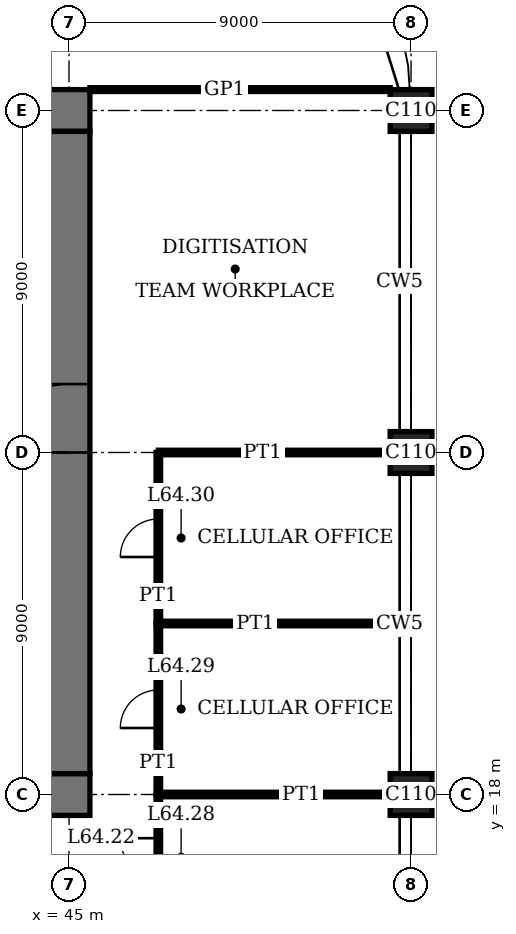
"""IFC4 building model, lengths in metres.
Left out: names, types, materials, properties, quantities, classifications, styles, units other than length and angle.
Written with IfcOpenShell. Run it as: python <this file> out.ifc"""

import sys

from ifc_helpers import new_model, si_unit, direction, frame, frame_2d, origin, origin_2d, place, context, subcontext, project, spatial, rectangle, extrude, element, fill, save


model = new_model("IFC4")
c1 = context("Model", 3, precision=1e-05, world=origin(), true_north=direction((0.0, 1.0)))
c2 = subcontext(c1, "Body", "Model", "MODEL_VIEW")
j1 = project(units=[si_unit("LENGTHUNIT", "METRE"), si_unit("PLANEANGLEUNIT", "RADIAN")], contexts=[c1])
p1 = place(None, origin())
s1 = spatial("IfcSite", under=j1, at=p1, CompositionType="ELEMENT")
p2 = place(p1, origin())
s2 = spatial("IfcBuilding", under=s1, at=p2, CompositionType="ELEMENT")
p3 = place(p2, frame((0.0, 0.0, 263.4)))
s3 = spatial("IfcBuildingStorey", under=s2, at=p3, CompositionType="ELEMENT", Elevation=263.4)
for number, where, z_axis, x_axis in (
    (1, (54.0, 18.0, 0.0), (0.0, 0.0, 1.0), (1.0, 0.0, 0.0)),
    (2, (54.0, 27.0, 0.0), (0.0, 0.0, 1.0), (1.0, 0.0, 0.0)),
    (3, (54.0, 36.0, 0.0), (0.0, 0.0, 1.0), (1.0, 0.0, 0.0)),
):
    element("IfcColumn", number, at=place(p3, frame(where, z_axis=z_axis, x_axis=x_axis)), inside=s3, PredefinedType="COLUMN", context=c2, shape_type="SweptSolid", body=[
        extrude(rectangle(XDim=1.1, YDim=1.1, at=origin_2d()), origin(), (0.0, 0.0, 1.0), 4.0),
    ])
p4 = place(p3, frame((17.45, 18.0, 0.0), z_axis=(0.0, 0.0, 1.0), x_axis=(1.0, 0.0, 0.0)))
e4 = element("IfcWall", 4, at=p4, inside=s3, PredefinedType="SHEAR", context=c2, shape_type="SweptSolid", body=[
    extrude(rectangle(XDim=28.1, YDim=1.1, at=frame_2d((14.05, 0.0))), origin(), (0.0, 0.0, 1.0), 4.0),
])
p5 = place(p4, frame((11.55, 0.0, 0.0)))
e5 = element("IfcOpeningElement", 5, at=p5, cuts=e4, PredefinedType="OPENING", context=c2, shape_type="SweptSolid", body=[
    extrude(rectangle(XDim=1.0, YDim=2.4, at=frame_2d((0.5, 1.2))), frame((0.0, 0.56, 0.0), z_axis=(0.0, -1.0, 0.0), x_axis=(1.0, 0.0, 0.0)), (0.0, 0.0, 1.0), 1.12),
])
p6 = place(p4, frame((16.55, 0.0, 0.0)))
e6 = element("IfcOpeningElement", 6, at=p6, cuts=e4, PredefinedType="OPENING", context=c2, shape_type="SweptSolid", body=[
    extrude(rectangle(XDim=1.0, YDim=2.4, at=frame_2d((0.5, 1.2))), frame((0.0, 0.56, 0.0), z_axis=(0.0, -1.0, 0.0), x_axis=(1.0, 0.0, 0.0)), (0.0, 0.0, 1.0), 1.12),
])
p7 = place(p4, frame((20.0, 0.0, 0.0)))
e7 = element("IfcOpeningElement", 7, at=p7, cuts=e4, PredefinedType="OPENING", context=c2, shape_type="SweptSolid", body=[
    extrude(rectangle(XDim=1.1, YDim=2.4, at=frame_2d((0.55, 1.2))), frame((0.0, 0.56, 0.0), z_axis=(0.0, -1.0, 0.0), x_axis=(1.0, 0.0, 0.0)), (0.0, 0.0, 1.0), 1.12),
])
p8 = place(p4, frame((24.05, 0.0, 0.0)))
e8 = element("IfcOpeningElement", 8, at=p8, cuts=e4, PredefinedType="OPENING", context=c2, shape_type="SweptSolid", body=[
    extrude(rectangle(XDim=1.0, YDim=2.4, at=frame_2d((0.5, 1.2))), frame((0.0, 0.56, 0.0), z_axis=(0.0, -1.0, 0.0), x_axis=(1.0, 0.0, 0.0)), (0.0, 0.0, 1.0), 1.12),
])
p9 = place(p3, frame((45.55, 36.0, 0.0), z_axis=(0.0, 0.0, 1.0), x_axis=(-1.0, 0.0, 0.0)))
e9 = element("IfcWall", 9, at=p9, inside=s3, PredefinedType="SHEAR", context=c2, shape_type="SweptSolid", body=[
    extrude(rectangle(XDim=28.1, YDim=1.1, at=frame_2d((14.05, 0.0))), origin(), (0.0, 0.0, 1.0), 4.0),
])
p10 = place(p9, frame((11.55, 0.0, 0.0)))
e10 = element("IfcOpeningElement", 10, at=p10, cuts=e9, PredefinedType="OPENING", context=c2, shape_type="SweptSolid", body=[
    extrude(rectangle(XDim=1.0, YDim=2.4, at=frame_2d((0.5, 1.2))), frame((0.0, 0.56, 0.0), z_axis=(0.0, -1.0, 0.0), x_axis=(1.0, 0.0, 0.0)), (0.0, 0.0, 1.0), 1.12),
])
p11 = place(p9, frame((16.55, 0.0, 0.0)))
e11 = element("IfcOpeningElement", 11, at=p11, cuts=e9, PredefinedType="OPENING", context=c2, shape_type="SweptSolid", body=[
    extrude(rectangle(XDim=1.0, YDim=2.4, at=frame_2d((0.5, 1.2))), frame((0.0, 0.56, 0.0), z_axis=(0.0, -1.0, 0.0), x_axis=(1.0, 0.0, 0.0)), (0.0, 0.0, 1.0), 1.12),
])
p12 = place(p9, frame((20.0, 0.0, 0.0)))
e12 = element("IfcOpeningElement", 12, at=p12, cuts=e9, PredefinedType="OPENING", context=c2, shape_type="SweptSolid", body=[
    extrude(rectangle(XDim=1.1, YDim=2.4, at=frame_2d((0.55, 1.2))), frame((0.0, 0.56, 0.0), z_axis=(0.0, -1.0, 0.0), x_axis=(1.0, 0.0, 0.0)), (0.0, 0.0, 1.0), 1.12),
])
p13 = place(p9, frame((24.05, 0.0, 0.0)))
e13 = element("IfcOpeningElement", 13, at=p13, cuts=e9, PredefinedType="OPENING", context=c2, shape_type="SweptSolid", body=[
    extrude(rectangle(XDim=1.0, YDim=2.4, at=frame_2d((0.5, 1.2))), frame((0.0, 0.56, 0.0), z_axis=(0.0, -1.0, 0.0), x_axis=(1.0, 0.0, 0.0)), (0.0, 0.0, 1.0), 1.12),
])
p14 = place(p3, frame((45.0, 18.55, 0.0), z_axis=(0.0, 0.0, 1.0), x_axis=(0.0, 1.0, 0.0)))
e14 = element("IfcWall", 14, at=p14, inside=s3, PredefinedType="SHEAR", context=c2, shape_type="SweptSolid", body=[
    extrude(rectangle(XDim=16.9, YDim=1.1, at=frame_2d((8.45, 0.0))), origin(), (0.0, 0.0, 1.0), 4.0),
])
p15 = place(p14, frame((8.45, 0.0, 0.0)))
e15 = element("IfcOpeningElement", 15, at=p15, cuts=e14, PredefinedType="OPENING", context=c2, shape_type="SweptSolid", body=[
    extrude(rectangle(XDim=1.8, YDim=2.4, at=frame_2d((0.9, 1.2))), frame((0.0, 0.56, 0.0), z_axis=(0.0, -1.0, 0.0), x_axis=(1.0, 0.0, 0.0)), (0.0, 0.0, 1.0), 1.12),
])
p16 = place(p3, frame((47.35, 18.0, 0.0), z_axis=(0.0, 0.0, 1.0), x_axis=(1.0, 0.0, 0.0)))
e16 = element("IfcWall", 16, at=p16, inside=s3, PredefinedType="PARTITIONING", context=c2, shape_type="SweptSolid", body=[
    extrude(rectangle(XDim=6.1, YDim=0.12, at=frame_2d((3.05, 0.0))), origin(), (0.0, 0.0, 1.0), 3.05),
])
p17 = place(p3, frame((47.35, 22.5, 0.0), z_axis=(0.0, 0.0, 1.0), x_axis=(1.0, 0.0, 0.0)))
e17 = element("IfcWall", 17, at=p17, inside=s3, PredefinedType="PARTITIONING", context=c2, shape_type="SweptSolid", body=[
    extrude(rectangle(XDim=6.34, YDim=0.12, at=frame_2d((3.17, 0.0))), origin(), (0.0, 0.0, 1.0), 3.1),
])
p18 = place(p3, frame((47.35, 27.0, 0.0), z_axis=(0.0, 0.0, 1.0), x_axis=(1.0, 0.0, 0.0)))
e18 = element("IfcWall", 18, at=p18, inside=s3, PredefinedType="PARTITIONING", context=c2, shape_type="SweptSolid", body=[
    extrude(rectangle(XDim=6.1, YDim=0.12, at=frame_2d((3.05, 0.0))), origin(), (0.0, 0.0, 1.0), 3.05),
])
p19 = place(p3, frame((45.55, 36.55, 0.0), z_axis=(0.0, 0.0, 1.0), x_axis=(1.0, 0.0, 0.0)))
e19 = element("IfcWall", 19, at=p19, inside=s3, PredefinedType="PARTITIONING", context=c2, shape_type="SweptSolid", body=[
    extrude(rectangle(XDim=7.9, YDim=0.1, at=frame_2d((3.95, 0.0))), origin(), (0.0, 0.0, 1.0), 3.75),
])
p20 = place(p3, frame((47.35, 13.5, 0.0), z_axis=(0.0, 0.0, 1.0), x_axis=(0.0, 1.0, 0.0)))
e20 = element("IfcWall", 20, at=p20, inside=s3, PredefinedType="PARTITIONING", context=c2, shape_type="SweptSolid", body=[
    extrude(rectangle(XDim=4.5, YDim=0.12, at=frame_2d((2.25, 0.0))), origin(), (0.0, 0.0, 1.0), 3.75),
])
p21 = place(p20, frame((2.35, 0.0, 0.0)))
e21 = element("IfcOpeningElement", 21, at=p21, cuts=e20, PredefinedType="OPENING", context=c2, shape_type="SweptSolid", body=[
    extrude(rectangle(XDim=1.0, YDim=2.4, at=frame_2d((0.5, 1.2))), frame((0.0, 0.07, 0.0), z_axis=(0.0, -1.0, 0.0), x_axis=(1.0, 0.0, 0.0)), (0.0, 0.0, 1.0), 0.14),
])
p22 = place(p3, frame((47.35, 18.0, 0.0), z_axis=(0.0, 0.0, 1.0), x_axis=(0.0, 1.0, 0.0)))
e22 = element("IfcWall", 22, at=p22, inside=s3, PredefinedType="PARTITIONING", context=c2, shape_type="SweptSolid", body=[
    extrude(rectangle(XDim=4.5, YDim=0.12, at=frame_2d((2.25, 0.0))), origin(), (0.0, 0.0, 1.0), 3.75),
])
p23 = place(p22, frame((1.75, 0.0, 0.0)))
e23 = element("IfcOpeningElement", 23, at=p23, cuts=e22, PredefinedType="OPENING", context=c2, shape_type="SweptSolid", body=[
    extrude(rectangle(XDim=1.0, YDim=2.4, at=frame_2d((0.5, 1.2))), frame((0.0, 0.07, 0.0), z_axis=(0.0, -1.0, 0.0), x_axis=(1.0, 0.0, 0.0)), (0.0, 0.0, 1.0), 0.14),
])
p24 = place(p3, frame((47.35, 22.5, 0.0), z_axis=(0.0, 0.0, 1.0), x_axis=(0.0, 1.0, 0.0)))
e24 = element("IfcWall", 24, at=p24, inside=s3, PredefinedType="PARTITIONING", context=c2, shape_type="SweptSolid", body=[
    extrude(rectangle(XDim=4.5, YDim=0.12, at=frame_2d((2.25, 0.0))), origin(), (0.0, 0.0, 1.0), 3.75),
])
p25 = place(p24, frame((1.75, 0.0, 0.0)))
e25 = element("IfcOpeningElement", 25, at=p25, cuts=e24, PredefinedType="OPENING", context=c2, shape_type="SweptSolid", body=[
    extrude(rectangle(XDim=1.0, YDim=2.4, at=frame_2d((0.5, 1.2))), frame((0.0, 0.07, 0.0), z_axis=(0.0, -1.0, 0.0), x_axis=(1.0, 0.0, 0.0)), (0.0, 0.0, 1.0), 0.14),
])
p26 = place(p15, origin())
e26 = element("IfcDoor", 26, at=p26, inside=s3, OperationType="DOUBLE_DOOR_DOUBLE_SWING", PredefinedType="DOOR", context=c2, shape_type="SweptSolid", body=[
    extrude(rectangle(XDim=1.8, YDim=2.4, at=frame_2d((0.9, 1.2))), frame((0.0, 0.03, 0.0), z_axis=(0.0, -1.0, 0.0), x_axis=(1.0, 0.0, 0.0)), (0.0, 0.0, 1.0), 0.06),
    extrude(rectangle(XDim=0.04, YDim=2.4, at=frame_2d((0.02, 1.2))), frame((0.0, 0.55, 0.0), z_axis=(0.0, -1.0, 0.0), x_axis=(1.0, 0.0, 0.0)), (0.0, 0.0, 1.0), 1.1),
    extrude(rectangle(XDim=0.04, YDim=2.4, at=frame_2d((1.78, 1.2))), frame((0.0, 0.55, 0.0), z_axis=(0.0, -1.0, 0.0), x_axis=(1.0, 0.0, 0.0)), (0.0, 0.0, 1.0), 1.1),
    extrude(rectangle(XDim=1.8, YDim=0.04, at=frame_2d((0.9, 2.38))), frame((0.0, 0.55, 0.0), z_axis=(0.0, -1.0, 0.0), x_axis=(1.0, 0.0, 0.0)), (0.0, 0.0, 1.0), 1.1),
])
fill(e15, e26)
p27 = place(p21, origin())
e27 = element("IfcDoor", 27, at=p27, inside=s3, OperationType="SINGLE_SWING_LEFT", PredefinedType="DOOR", context=c2, shape_type="SweptSolid", body=[
    extrude(rectangle(XDim=1.0, YDim=2.4, at=frame_2d((0.5, 1.2))), frame((0.0, 0.025, 0.0), z_axis=(0.0, -1.0, 0.0), x_axis=(1.0, 0.0, 0.0)), (0.0, 0.0, 1.0), 0.05),
])
fill(e21, e27)
p28 = place(p23, origin())
e28 = element("IfcDoor", 28, at=p28, inside=s3, OperationType="SINGLE_SWING_RIGHT", PredefinedType="DOOR", context=c2, shape_type="SweptSolid", body=[
    extrude(rectangle(XDim=1.0, YDim=2.4, at=frame_2d((0.5, 1.2))), frame((0.0, 0.025, 0.0), z_axis=(0.0, -1.0, 0.0), x_axis=(1.0, 0.0, 0.0)), (0.0, 0.0, 1.0), 0.05),
])
fill(e23, e28)
p29 = place(p25, origin())
e29 = element("IfcDoor", 29, at=p29, inside=s3, OperationType="SINGLE_SWING_RIGHT", PredefinedType="DOOR", context=c2, shape_type="SweptSolid", body=[
    extrude(rectangle(XDim=1.0, YDim=2.4, at=frame_2d((0.5, 1.2))), frame((0.0, 0.025, 0.0), z_axis=(0.0, -1.0, 0.0), x_axis=(1.0, 0.0, 0.0)), (0.0, 0.0, 1.0), 0.05),
])
fill(e25, e29)
save(model, sys.argv[1])
